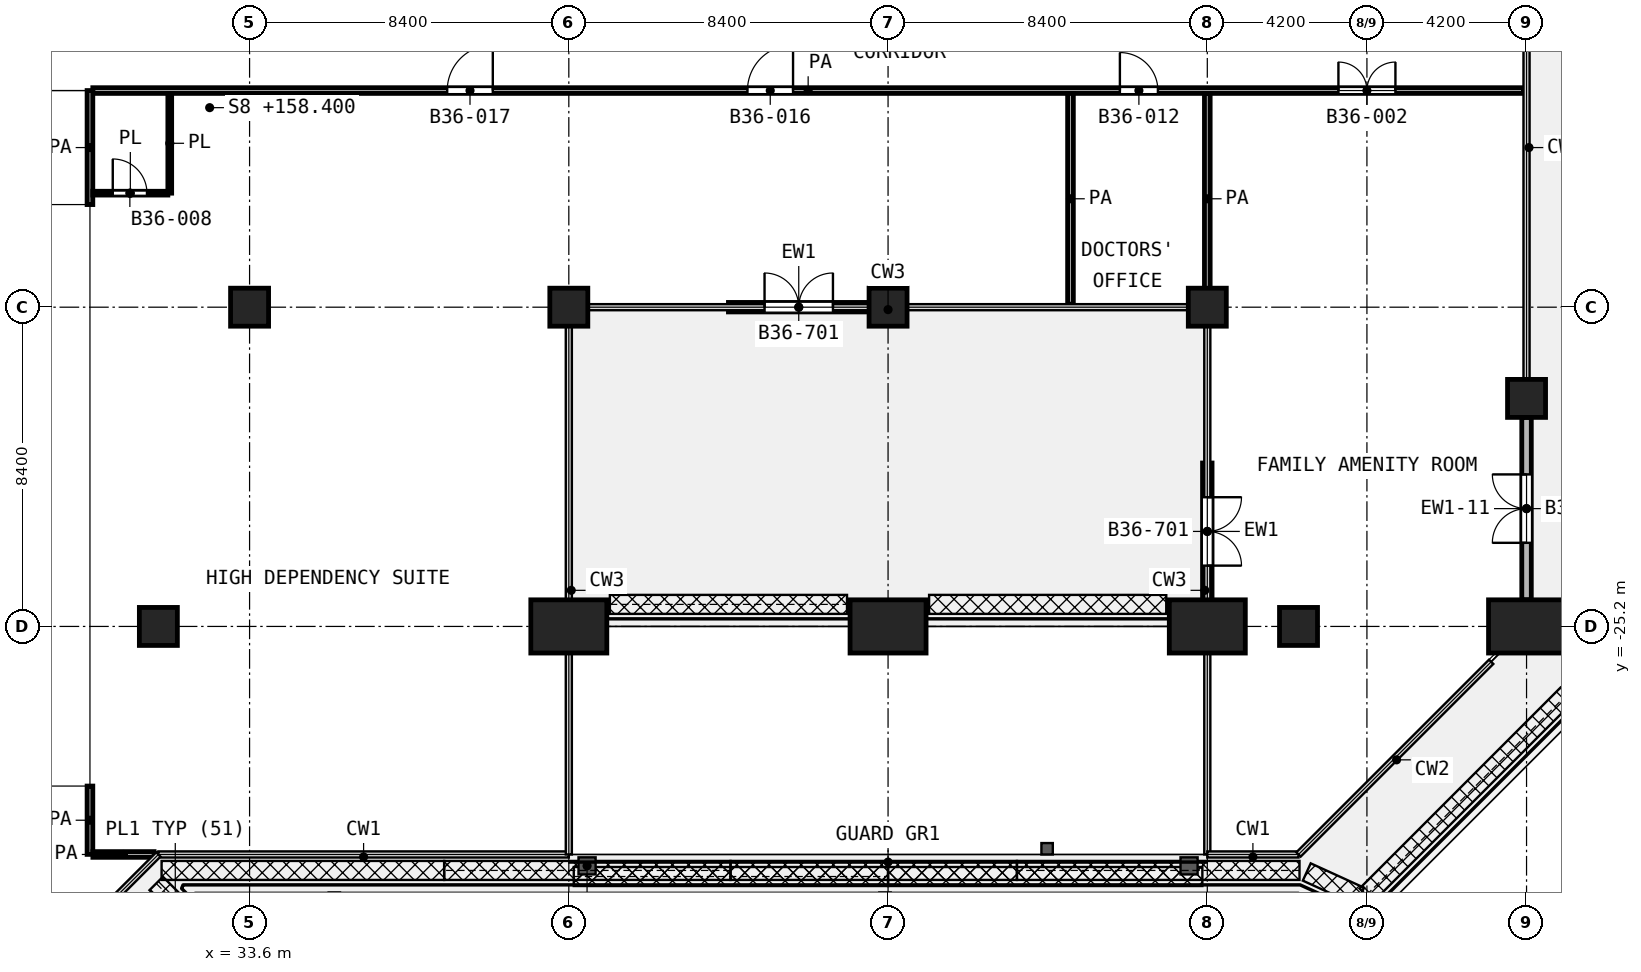
"""IFC4 building model, lengths in metres.
Left out: names, types, materials, properties, quantities, classifications, styles, units other than length and angle.
Written with IfcOpenShell. Run it as: python <this file> out.ifc"""

import sys

from ifc_helpers import new_model, si_unit, direction, frame, frame_2d, origin, origin_2d, place, context, subcontext, project, spatial, rectangle, extrude, element, fill, save


model = new_model("IFC4")
c1 = context("Model", 3, precision=1e-05, world=origin(), true_north=direction((0.0, 1.0)))
c2 = subcontext(c1, "Body", "Model", "MODEL_VIEW")
j1 = project(units=[si_unit("LENGTHUNIT", "METRE"), si_unit("PLANEANGLEUNIT", "RADIAN")], contexts=[c1])
p1 = place(None, origin())
s1 = spatial("IfcSite", under=j1, at=p1, CompositionType="ELEMENT")
p2 = place(p1, origin())
s2 = spatial("IfcBuilding", under=s1, at=p2, CompositionType="ELEMENT")
p3 = place(p2, frame((0.0, 0.0, 158.4)))
s3 = spatial("IfcBuildingStorey", under=s2, at=p3, CompositionType="ELEMENT", Elevation=158.4)
for number, where, z_axis, x_axis in (
    (1, (33.6, -16.8, 0.0), (0.0, 0.0, 1.0), (1.0, 0.0, 0.0)),
    (2, (42.0, -16.8, 0.0), (0.0, 0.0, 1.0), (1.0, 0.0, 0.0)),
    (3, (50.4, -16.8, 0.0), (0.0, 0.0, 1.0), (1.0, 0.0, 0.0)),
    (4, (58.8, -16.8, 0.0), (0.0, 0.0, 1.0), (1.0, 0.0, 0.0)),
    (5, (67.2, -19.2, 0.0), (0.0, 0.0, 1.0), (1.0, 0.0, 0.0)),
    (6, (31.2, -25.2, 0.0), (0.0, 0.0, 1.0), (1.0, 0.0, 0.0)),
):
    element("IfcColumn", number, at=place(p3, frame(where, z_axis=z_axis, x_axis=x_axis)), inside=s3, PredefinedType="COLUMN", context=c2, shape_type="SweptSolid", body=[
        extrude(rectangle(XDim=1.0, YDim=1.0, at=origin_2d()), origin(), (0.0, 0.0, 1.0), 4.2),
    ])
for number, where, z_axis, x_axis in (
    (7, (42.0, -25.2, 0.0), (0.0, 0.0, 1.0), (-1.0, 0.0, 0.0)),
    (8, (50.4, -25.2, 0.0), (0.0, 0.0, 1.0), (-1.0, 0.0, 0.0)),
):
    element("IfcColumn", number, at=place(p3, frame(where, z_axis=z_axis, x_axis=x_axis)), inside=s3, PredefinedType="COLUMN", context=c2, shape_type="SweptSolid", body=[
        extrude(rectangle(XDim=2.0, YDim=1.4, at=origin_2d()), origin(), (0.0, 0.0, 1.0), 4.2),
    ])
p4 = place(p3, frame((61.2, -25.2, 0.0), z_axis=(0.0, 0.0, 1.0), x_axis=(1.0, 0.0, 0.0)))
e9 = element("IfcColumn", 9, at=p4, inside=s3, PredefinedType="COLUMN", context=c2, shape_type="SweptSolid", body=[
    extrude(rectangle(XDim=1.0, YDim=1.0, at=origin_2d()), origin(), (0.0, 0.0, 1.0), 4.2),
])
for number, where, z_axis, x_axis in (
    (10, (67.2, -25.2, 0.0), (0.0, 0.0, 1.0), (-1.0, 0.0, 0.0)),
    (11, (58.8, -25.2, 0.0), (0.0, 0.0, 1.0), (-1.0, 0.0, 0.0)),
):
    element("IfcColumn", number, at=place(p3, frame(where, z_axis=z_axis, x_axis=x_axis)), inside=s3, PredefinedType="COLUMN", context=c2, shape_type="SweptSolid", body=[
        extrude(rectangle(XDim=2.0, YDim=1.4, at=origin_2d()), origin(), (0.0, 0.0, 1.0), 4.2),
    ])
p5 = place(p3, frame((46.2, -16.8, 0.0), z_axis=(0.0, 0.0, 1.0), x_axis=(1.0, 0.0, 0.0)))
e12 = element("IfcWall", 12, at=p5, inside=s3, PredefinedType="SOLIDWALL", context=c2, shape_type="SweptSolid", body=[
    extrude(rectangle(XDim=3.7, YDim=0.25, at=frame_2d((1.85, 0.0))), origin(), (0.0, 0.0, 1.0), 3.46),
])
p6 = place(p5, frame((0.95, 0.0, 0.0)))
e13 = element("IfcOpeningElement", 13, at=p6, cuts=e12, PredefinedType="OPENING", context=c2, shape_type="SweptSolid", body=[
    extrude(rectangle(XDim=1.8, YDim=2.1, at=frame_2d((0.9, 1.05))), frame((0.0, 0.135, 0.0), z_axis=(0.0, -1.0, 0.0), x_axis=(1.0, 0.0, 0.0)), (0.0, 0.0, 1.0), 0.27),
])
p7 = place(p3, frame((58.8, -20.9, 0.0), z_axis=(0.0, 0.0, 1.0), x_axis=(0.0, -1.0, 0.0)))
e14 = element("IfcWall", 14, at=p7, inside=s3, PredefinedType="SOLIDWALL", context=c2, shape_type="SweptSolid", body=[
    extrude(rectangle(XDim=3.6, YDim=0.25, at=frame_2d((1.8, 0.0))), origin(), (0.0, 0.0, 1.0), 3.46),
])
p8 = place(p7, frame((0.9, 0.0, 0.0)))
e15 = element("IfcOpeningElement", 15, at=p8, cuts=e14, PredefinedType="OPENING", context=c2, shape_type="SweptSolid", body=[
    extrude(rectangle(XDim=1.8, YDim=2.1, at=frame_2d((0.9, 1.05))), frame((0.0, 0.135, 0.0), z_axis=(0.0, -1.0, 0.0), x_axis=(1.0, 0.0, 0.0)), (0.0, 0.0, 1.0), 0.27),
])
p9 = place(p3, frame((67.2, -24.5, 0.0), z_axis=(0.0, 0.0, 1.0), x_axis=(0.0, 1.0, 0.0)))
e16 = element("IfcWall", 16, at=p9, inside=s3, PredefinedType="SOLIDWALL", context=c2, shape_type="SweptSolid", body=[
    extrude(rectangle(XDim=4.8, YDim=0.25, at=frame_2d((2.4, 0.0))), origin(), (0.0, 0.0, 1.0), 3.48),
])
p10 = place(p9, frame((1.5, 0.0, 0.0)))
e17 = element("IfcOpeningElement", 17, at=p10, cuts=e16, PredefinedType="OPENING", context=c2, shape_type="SweptSolid", body=[
    extrude(rectangle(XDim=1.8, YDim=2.1, at=frame_2d((0.9, 1.05))), frame((0.0, 0.135, 0.0), z_axis=(0.0, -1.0, 0.0), x_axis=(1.0, 0.0, 0.0)), (0.0, 0.0, 1.0), 0.27),
])
p11 = place(p3, frame((29.475, -13.8, 0.0), z_axis=(0.0, 0.0, 1.0), x_axis=(1.0, 0.0, 0.0)))
e18 = element("IfcWall", 18, at=p11, inside=s3, PredefinedType="PARTITIONING", context=c2, shape_type="SweptSolid", body=[
    extrude(rectangle(XDim=1.975, YDim=0.1, at=frame_2d((0.987, 0.0))), origin(), (0.0, 0.0, 1.0), 3.6),
])
p12 = place(p11, frame((0.525, 0.0, 0.0)))
e19 = element("IfcOpeningElement", 19, at=p12, cuts=e18, PredefinedType="OPENING", context=c2, shape_type="SweptSolid", body=[
    extrude(rectangle(XDim=0.9, YDim=2.1, at=frame_2d((0.45, 1.05))), frame((0.0, 0.06, 0.0), z_axis=(0.0, -1.0, 0.0), x_axis=(1.0, 0.0, 0.0)), (0.0, 0.0, 1.0), 0.12),
])
p13 = place(p3, frame((31.5, -13.8, 0.0), z_axis=(0.0, 0.0, 1.0), x_axis=(0.0, 1.0, 0.0)))
e20 = element("IfcWall", 20, at=p13, inside=s3, PredefinedType="PARTITIONING", context=c2, shape_type="SweptSolid", body=[
    extrude(rectangle(XDim=2.625, YDim=0.1, at=frame_2d((1.312, 0.0))), origin(), (0.0, 0.0, 1.0), 3.6),
])
p14 = place(p3, frame((29.477, -31.2, 0.0), z_axis=(0.0, 0.0, 1.0), x_axis=(1.0, 0.0, 0.0)))
e21 = element("IfcWall", 21, at=p14, inside=s3, PredefinedType="PARTITIONING", context=c2, shape_type="SweptSolid", body=[
    extrude(rectangle(XDim=1.61, YDim=0.15, at=frame_2d((0.805, 0.0))), origin(), (0.0, 0.0, 1.0), 3.6),
])
p15 = place(p3, frame((29.475, -11.1, 0.0), z_axis=(0.0, 0.0, 1.0), x_axis=(1.0, 0.0, 0.0)))
e22 = element("IfcWall", 22, at=p15, inside=s3, PredefinedType="PARTITIONING", context=c2, shape_type="SweptSolid", body=[
    extrude(rectangle(XDim=37.645, YDim=0.15, at=frame_2d((18.823, 0.0))), origin(), (0.0, 0.0, 1.0), 3.6),
])
p16 = place(p15, frame((17.225, 0.0, 0.0)))
e23 = element("IfcOpeningElement", 23, at=p16, cuts=e22, PredefinedType="OPENING", context=c2, shape_type="SweptSolid", body=[
    extrude(rectangle(XDim=1.2, YDim=2.1, at=frame_2d((0.6, 1.05))), frame((0.0, 0.085, 0.0), z_axis=(0.0, -1.0, 0.0), x_axis=(1.0, 0.0, 0.0)), (0.0, 0.0, 1.0), 0.17),
])
p17 = place(p15, frame((9.325, 0.0, 0.0)))
e24 = element("IfcOpeningElement", 24, at=p17, cuts=e22, PredefinedType="OPENING", context=c2, shape_type="SweptSolid", body=[
    extrude(rectangle(XDim=1.2, YDim=2.1, at=frame_2d((0.6, 1.05))), frame((0.0, 0.085, 0.0), z_axis=(0.0, -1.0, 0.0), x_axis=(1.0, 0.0, 0.0)), (0.0, 0.0, 1.0), 0.17),
])
p18 = place(p15, frame((27.025, 0.0, 0.0)))
e25 = element("IfcOpeningElement", 25, at=p18, cuts=e22, PredefinedType="OPENING", context=c2, shape_type="SweptSolid", body=[
    extrude(rectangle(XDim=1.0, YDim=2.1, at=frame_2d((0.5, 1.05))), frame((0.0, 0.085, 0.0), z_axis=(0.0, -1.0, 0.0), x_axis=(1.0, 0.0, 0.0)), (0.0, 0.0, 1.0), 0.17),
])
p19 = place(p15, frame((32.775, 0.0, 0.0)))
e26 = element("IfcOpeningElement", 26, at=p19, cuts=e22, PredefinedType="OPENING", context=c2, shape_type="SweptSolid", body=[
    extrude(rectangle(XDim=1.5, YDim=2.1, at=frame_2d((0.75, 1.05))), frame((0.0, 0.085, 0.0), z_axis=(0.0, -1.0, 0.0), x_axis=(1.0, 0.0, 0.0)), (0.0, 0.0, 1.0), 0.17),
])
p20 = place(p3, frame((29.4, -31.198, 0.0), z_axis=(0.0, 0.0, 1.0), x_axis=(0.0, 1.0, 0.0)))
e27 = element("IfcWall", 27, at=p20, inside=s3, PredefinedType="PARTITIONING", context=c2, shape_type="SweptSolid", body=[
    extrude(rectangle(XDim=1.798, YDim=0.15, at=frame_2d((0.899, 0.0))), origin(), (0.0, 0.0, 1.0), 3.6),
])
p21 = place(p3, frame((29.4, -14.1, 0.0), z_axis=(0.0, 0.0, 1.0), x_axis=(0.0, 1.0, 0.0)))
e28 = element("IfcWall", 28, at=p21, inside=s3, PredefinedType="PARTITIONING", context=c2, shape_type="SweptSolid", body=[
    extrude(rectangle(XDim=3.0, YDim=0.15, at=frame_2d((1.5, 0.0))), origin(), (0.0, 0.0, 1.0), 3.6),
])
for number, where, z_axis, x_axis in (
    (29, (55.2, -16.72, 0.0), (0.0, 0.0, 1.0), (0.0, 1.0, 0.0)),
    (30, (58.8, -16.72, 0.0), (0.0, 0.0, 1.0), (0.0, 1.0, 0.0)),
):
    element("IfcWall", number, at=place(p3, frame(where, z_axis=z_axis, x_axis=x_axis)), inside=s3, PredefinedType="PARTITIONING", context=c2, shape_type="SweptSolid", body=[
        extrude(rectangle(XDim=5.545, YDim=0.15, at=frame_2d((2.772, 0.0))), origin(), (0.0, 0.0, 1.0), 3.6),
    ])
p22 = place(p6, origin())
e31 = element("IfcDoor", 31, at=p22, inside=s3, OperationType="DOUBLE_DOOR_SINGLE_SWING", PredefinedType="DOOR", context=c2, shape_type="SweptSolid", body=[
    extrude(rectangle(XDim=1.8, YDim=2.1, at=frame_2d((0.9, 1.05))), frame((0.0, 0.025, 0.0), z_axis=(0.0, -1.0, 0.0), x_axis=(1.0, 0.0, 0.0)), (0.0, 0.0, 1.0), 0.05),
])
fill(e13, e31)
p23 = place(p8, origin())
e32 = element("IfcDoor", 32, at=p23, inside=s3, OperationType="DOUBLE_DOOR_SINGLE_SWING", PredefinedType="DOOR", context=c2, shape_type="SweptSolid", body=[
    extrude(rectangle(XDim=1.8, YDim=2.1, at=frame_2d((0.9, 1.05))), frame((0.0, 0.025, 0.0), z_axis=(0.0, -1.0, 0.0), x_axis=(1.0, 0.0, 0.0)), (0.0, 0.0, 1.0), 0.05),
])
fill(e15, e32)
p24 = place(p10, origin())
e33 = element("IfcDoor", 33, at=p24, inside=s3, OperationType="DOUBLE_DOOR_SINGLE_SWING", PredefinedType="DOOR", context=c2, shape_type="SweptSolid", body=[
    extrude(rectangle(XDim=1.8, YDim=2.1, at=frame_2d((0.9, 1.05))), frame((0.0, 0.025, 0.0), z_axis=(0.0, -1.0, 0.0), x_axis=(1.0, 0.0, 0.0)), (0.0, 0.0, 1.0), 0.05),
])
fill(e17, e33)
p25 = place(p16, origin())
e34 = element("IfcDoor", 34, at=p25, inside=s3, OperationType="SINGLE_SWING_RIGHT", PredefinedType="DOOR", context=c2, shape_type="SweptSolid", body=[
    extrude(rectangle(XDim=1.2, YDim=2.1, at=frame_2d((0.6, 1.05))), frame((0.0, 0.025, 0.0), z_axis=(0.0, -1.0, 0.0), x_axis=(1.0, 0.0, 0.0)), (0.0, 0.0, 1.0), 0.05),
])
fill(e23, e34)
p26 = place(p17, origin())
e35 = element("IfcDoor", 35, at=p26, inside=s3, OperationType="SINGLE_SWING_RIGHT", PredefinedType="DOOR", context=c2, shape_type="SweptSolid", body=[
    extrude(rectangle(XDim=1.2, YDim=2.1, at=frame_2d((0.6, 1.05))), frame((0.0, 0.025, 0.0), z_axis=(0.0, -1.0, 0.0), x_axis=(1.0, 0.0, 0.0)), (0.0, 0.0, 1.0), 0.05),
])
fill(e24, e35)
p27 = place(p12, origin())
e36 = element("IfcDoor", 36, at=p27, inside=s3, OperationType="SINGLE_SWING_LEFT", PredefinedType="DOOR", context=c2, shape_type="SweptSolid", body=[
    extrude(rectangle(XDim=0.9, YDim=2.1, at=frame_2d((0.45, 1.05))), frame((0.0, 0.025, 0.0), z_axis=(0.0, -1.0, 0.0), x_axis=(1.0, 0.0, 0.0)), (0.0, 0.0, 1.0), 0.05),
])
fill(e19, e36)
p28 = place(p18, origin())
e37 = element("IfcDoor", 37, at=p28, inside=s3, OperationType="SINGLE_SWING_LEFT", PredefinedType="DOOR", context=c2, shape_type="SweptSolid", body=[
    extrude(rectangle(XDim=1.0, YDim=2.1, at=frame_2d((0.5, 1.05))), frame((0.0, 0.025, 0.0), z_axis=(0.0, -1.0, 0.0), x_axis=(1.0, 0.0, 0.0)), (0.0, 0.0, 1.0), 0.05),
])
fill(e25, e37)
p29 = place(p19, origin())
e38 = element("IfcDoor", 38, at=p29, inside=s3, OperationType="DOUBLE_DOOR_SINGLE_SWING", PredefinedType="DOOR", context=c2, shape_type="SweptSolid", body=[
    extrude(rectangle(XDim=1.5, YDim=2.1, at=frame_2d((0.75, 1.05))), frame((0.0, 0.025, 0.0), z_axis=(0.0, -1.0, 0.0), x_axis=(1.0, 0.0, 0.0)), (0.0, 0.0, 1.0), 0.05),
])
fill(e26, e38)
save(model, sys.argv[1])
